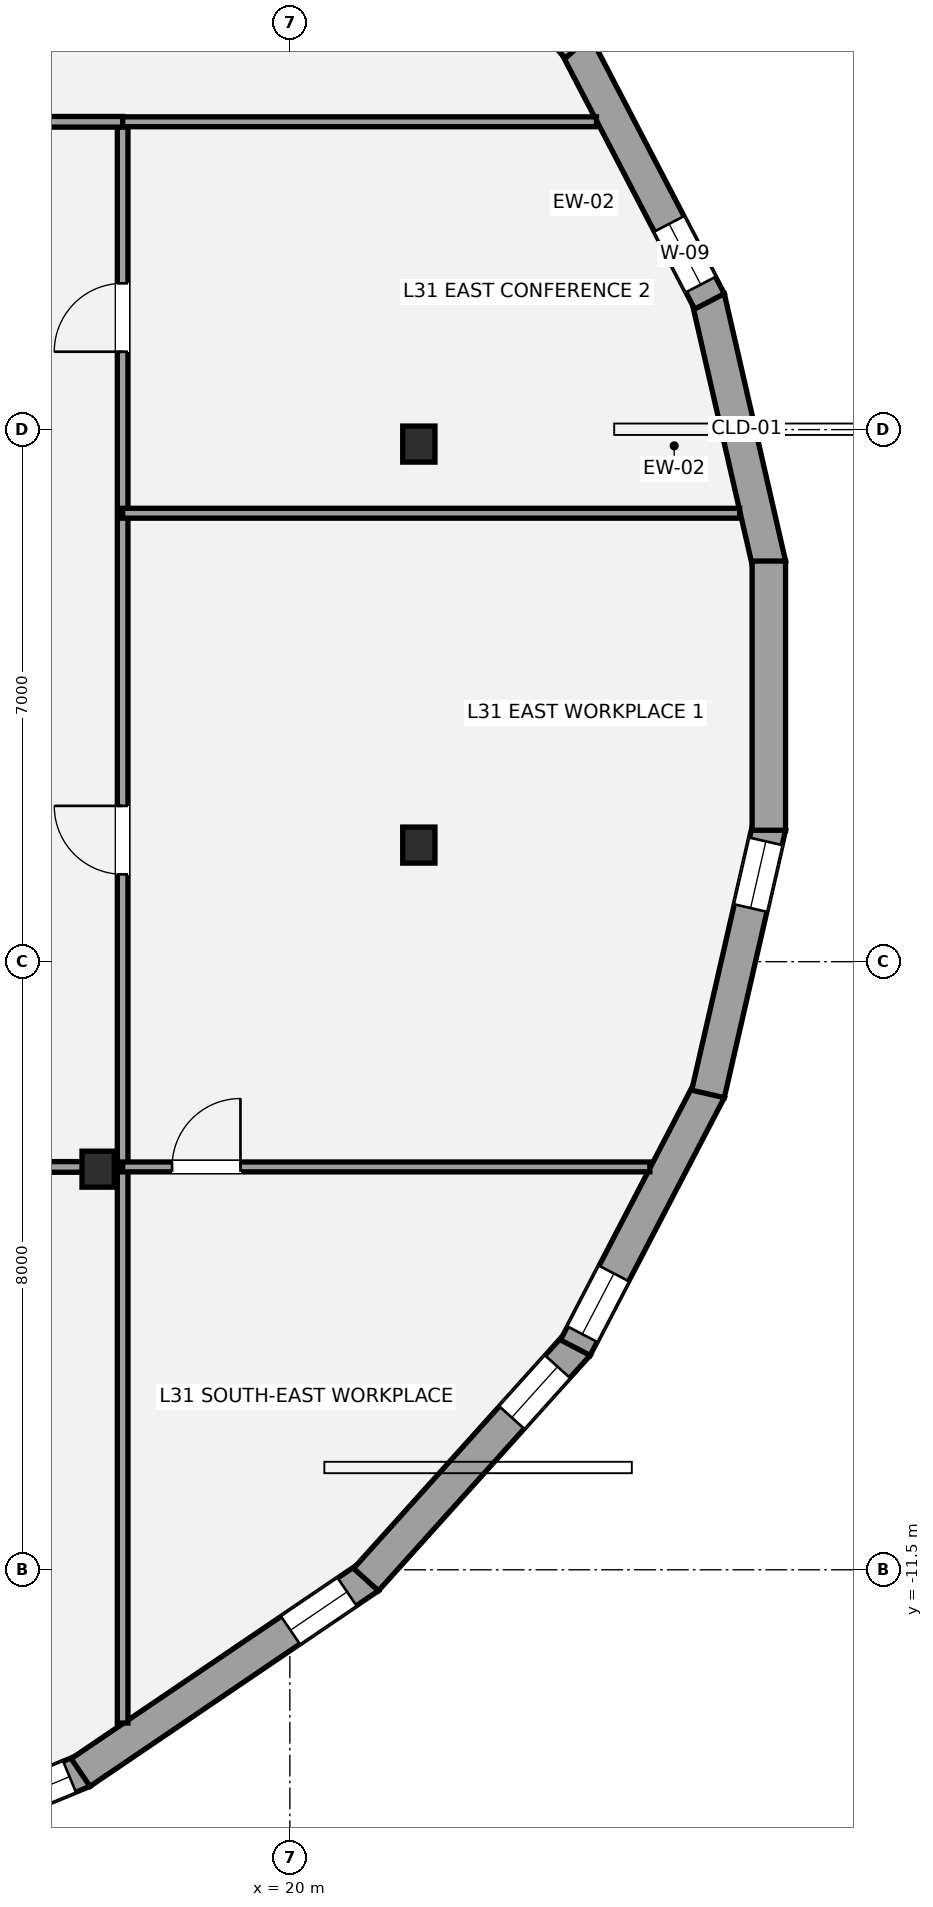
"""IFC4 building model, lengths in metres.
Left out: names, types, materials, properties, quantities, classifications, styles, units other than length and angle.
Written with IfcOpenShell. Run it as: python <this file> out.ifc"""

import sys

from ifc_helpers import new_model, si_unit, direction, frame, frame_2d, origin, origin_2d, place, context, subcontext, project, spatial, rectangle, i_section, extrude, element, fill, save


model = new_model("IFC4")
c1 = context("Model", 3, precision=1e-05, world=origin(), true_north=direction((0.0, 1.0)))
c2 = subcontext(c1, "Body", "Model", "MODEL_VIEW")
j1 = project(units=[si_unit("LENGTHUNIT", "METRE"), si_unit("PLANEANGLEUNIT", "RADIAN")], contexts=[c1])
p1 = place(None, origin())
s1 = spatial("IfcSite", under=j1, at=p1, CompositionType="ELEMENT")
p2 = place(p1, origin())
s2 = spatial("IfcBuilding", under=s1, at=p2, CompositionType="ELEMENT")
p3 = place(p2, frame((0.0, 0.0, 117.6)))
s3 = spatial("IfcBuildingStorey", under=s2, at=p3, CompositionType="ELEMENT", Elevation=117.6)
for number, where, z_axis, x_axis in (
    (1, (21.697, 3.31, 0.0), (0.0, 0.0, 1.0), (1.0, 0.0, 0.0)),
    (2, (17.477, -6.229, 0.0), (0.0, 0.0, 1.0), (1.0, 0.0, 0.0)),
    (3, (21.697, -1.966, 0.0), (0.0, 0.0, 1.0), (1.0, 0.0, 0.0)),
):
    element("IfcColumn", number, at=place(p3, frame(where, z_axis=z_axis, x_axis=x_axis)), inside=s3, PredefinedType="COLUMN", context=c2, shape_type="SweptSolid", body=[
        extrude(i_section(OverallWidth=0.424, OverallDepth=0.474, WebThickness=0.048, FlangeThickness=0.077, at=origin_2d()), origin(), (0.0, 0.0, 1.0), 3.5),
    ])
p4 = place(p3, frame((25.502, 5.24, 0.0), z_axis=(0.0, 0.0, 1.0), x_axis=(0.223322591546, -0.974744592242, 0.0)))
e4 = element("IfcWall", 4, at=p4, inside=s3, PredefinedType="STANDARD", context=c2, shape_type="SweptSolid", body=[
    extrude(rectangle(XDim=3.609, YDim=0.44, at=frame_2d((1.804, 0.0))), origin(), (0.0, 0.0, 1.0), 2.528),
])
p5 = place(p3, frame((23.756, 8.578, 0.0), z_axis=(0.0, 0.0, 1.0), x_axis=(0.461766944701, -0.88700129018, 0.0)))
e5 = element("IfcWall", 5, at=p5, inside=s3, PredefinedType="STANDARD", context=c2, shape_type="SweptSolid", body=[
    extrude(rectangle(XDim=3.823, YDim=0.44, at=frame_2d((1.911, 0.0))), origin(), (0.0, 0.0, 1.0), 2.528),
])
p6 = place(p5, frame((2.673, 0.0, 0.58)))
e6 = element("IfcOpeningElement", 6, at=p6, cuts=e5, PredefinedType="OPENING", context=c2, shape_type="SweptSolid", body=[
    extrude(rectangle(XDim=0.9, YDim=1.35, at=frame_2d((0.45, 0.675))), frame((0.0, 0.23, 0.0), z_axis=(0.0, -1.0, 0.0), x_axis=(1.0, 0.0, 0.0)), (0.0, 0.0, 1.0), 0.46),
])
p7 = place(p3, frame((21.002, 11.629, 0.0), z_axis=(0.0, 0.0, 1.0), x_axis=(0.668754222456, -0.743483550556, 0.0)))
e7 = element("IfcWall", 7, at=p7, inside=s3, PredefinedType="STANDARD", context=c2, shape_type="SweptSolid", body=[
    extrude(rectangle(XDim=4.166, YDim=0.44, at=frame_2d((2.083, 0.0))), origin(), (0.0, 0.0, 1.0), 2.528),
])
p8 = place(p7, frame((0.348, 0.0, 0.58)))
e8 = element("IfcOpeningElement", 8, at=p8, cuts=e7, PredefinedType="OPENING", context=c2, shape_type="SweptSolid", body=[
    extrude(rectangle(XDim=0.9, YDim=1.35, at=frame_2d((0.45, 0.675))), frame((0.0, 0.23, 0.0), z_axis=(0.0, -1.0, 0.0), x_axis=(1.0, 0.0, 0.0)), (0.0, 0.0, 1.0), 0.46),
])
p9 = place(p3, frame((17.286, -14.146, 0.0), z_axis=(0.0, 0.0, 1.0), x_axis=(-0.924140141084, -0.382053660678, 0.0)))
e9 = element("IfcWall", 9, at=p9, inside=s3, PredefinedType="STANDARD", context=c2, shape_type="SweptSolid", body=[
    extrude(rectangle(XDim=4.943, YDim=0.44, at=frame_2d((2.471, 0.0))), origin(), (0.0, 0.0, 1.0), 2.528),
])
p10 = place(p9, frame((0.2, 0.0, 0.45)))
e10 = element("IfcOpeningElement", 10, at=p10, cuts=e9, PredefinedType="OPENING", context=c2, shape_type="SweptSolid", body=[
    extrude(rectangle(XDim=1.4, YDim=1.55, at=frame_2d((0.7, 0.775))), frame((0.0, 0.23, 0.0), z_axis=(0.0, -1.0, 0.0), x_axis=(1.0, 0.0, 0.0)), (0.0, 0.0, 1.0), 0.46),
])
p11 = place(p3, frame((21.042, -11.594, 0.0), z_axis=(0.0, 0.0, 1.0), x_axis=(-0.827700115196, -0.561170668607, 0.0)))
e11 = element("IfcWall", 11, at=p11, inside=s3, PredefinedType="STANDARD", context=c2, shape_type="SweptSolid", body=[
    extrude(rectangle(XDim=4.585, YDim=0.44, at=frame_2d((2.293, 0.0))), origin(), (0.0, 0.0, 1.0), 2.528),
])
p12 = place(p11, frame((0.349, 0.0, 0.58)))
e12 = element("IfcOpeningElement", 12, at=p12, cuts=e11, PredefinedType="OPENING", context=c2, shape_type="SweptSolid", body=[
    extrude(rectangle(XDim=0.9, YDim=1.35, at=frame_2d((0.45, 0.675))), frame((0.0, 0.23, 0.0), z_axis=(0.0, -1.0, 0.0), x_axis=(1.0, 0.0, 0.0)), (0.0, 0.0, 1.0), 0.46),
])
p13 = place(p3, frame((23.787, -8.532, 0.0), z_axis=(0.0, 0.0, 1.0), x_axis=(-0.668754222456, -0.743483550556, 0.0)))
e13 = element("IfcWall", 13, at=p13, inside=s3, PredefinedType="STANDARD", context=c2, shape_type="SweptSolid", body=[
    extrude(rectangle(XDim=4.166, YDim=0.44, at=frame_2d((2.083, 0.0))), origin(), (0.0, 0.0, 1.0), 2.528),
])
p14 = place(p13, frame((0.398, 0.0, 0.58)))
e14 = element("IfcOpeningElement", 14, at=p14, cuts=e13, PredefinedType="OPENING", context=c2, shape_type="SweptSolid", body=[
    extrude(rectangle(XDim=0.9, YDim=1.35, at=frame_2d((0.45, 0.675))), frame((0.0, 0.23, 0.0), z_axis=(0.0, -1.0, 0.0), x_axis=(1.0, 0.0, 0.0)), (0.0, 0.0, 1.0), 0.46),
])
p15 = place(p3, frame((25.521, -5.187, 0.0), z_axis=(0.0, 0.0, 1.0), x_axis=(-0.461766944701, -0.88700129018, 0.0)))
e15 = element("IfcWall", 15, at=p15, inside=s3, PredefinedType="STANDARD", context=c2, shape_type="SweptSolid", body=[
    extrude(rectangle(XDim=3.823, YDim=0.44, at=frame_2d((1.911, 0.0))), origin(), (0.0, 0.0, 1.0), 2.528),
])
p16 = place(p15, frame((2.722, 0.0, 0.58)))
e16 = element("IfcOpeningElement", 16, at=p16, cuts=e15, PredefinedType="OPENING", context=c2, shape_type="SweptSolid", body=[
    extrude(rectangle(XDim=0.9, YDim=1.35, at=frame_2d((0.45, 0.675))), frame((0.0, 0.23, 0.0), z_axis=(0.0, -1.0, 0.0), x_axis=(1.0, 0.0, 0.0)), (0.0, 0.0, 1.0), 0.46),
])
p17 = place(p3, frame((26.308, -1.722, 0.0), z_axis=(0.0, 0.0, 1.0), x_axis=(-0.223322591546, -0.974744592242, 0.0)))
e17 = element("IfcWall", 17, at=p17, inside=s3, PredefinedType="STANDARD", context=c2, shape_type="SweptSolid", body=[
    extrude(rectangle(XDim=3.609, YDim=0.44, at=frame_2d((1.804, 0.0))), origin(), (0.0, 0.0, 1.0), 2.528),
])
p18 = place(p17, frame((0.2, 0.0, 0.42)))
e18 = element("IfcOpeningElement", 18, at=p18, cuts=e17, PredefinedType="OPENING", context=c2, shape_type="SweptSolid", body=[
    extrude(rectangle(XDim=0.9, YDim=1.35, at=frame_2d((0.45, 0.675))), frame((0.0, 0.23, 0.0), z_axis=(0.0, -1.0, 0.0), x_axis=(1.0, 0.0, 0.0)), (0.0, 0.0, 1.0), 0.46),
])
p19 = place(p3, frame((26.302, 1.771, 0.0), z_axis=(0.0, 0.0, 1.0), x_axis=(0.0, -1.0, 0.0)))
e19 = element("IfcWall", 19, at=p19, inside=s3, PredefinedType="STANDARD", context=c2, shape_type="SweptSolid", body=[
    extrude(rectangle(XDim=3.542, YDim=0.44, at=frame_2d((1.771, 0.0))), origin(), (0.0, 0.0, 1.0), 2.528),
])
p20 = place(p3, frame((-16.2, -6.2, 0.0), z_axis=(0.0, 0.0, 1.0), x_axis=(1.0, 0.0, 0.0)))
e20 = element("IfcWall", 20, at=p20, inside=s3, PredefinedType="PARTITIONING", context=c2, shape_type="SweptSolid", body=[
    extrude(rectangle(XDim=34.0, YDim=0.14, at=frame_2d((17.0, 0.0))), origin(), (0.0, 0.0, 1.0), 2.688),
])
p21 = place(p20, frame((2.75, 0.0, 0.0)))
e21 = element("IfcOpeningElement", 21, at=p21, cuts=e20, PredefinedType="OPENING", context=c2, shape_type="SweptSolid", body=[
    extrude(rectangle(XDim=0.9, YDim=2.1, at=frame_2d((0.45, 1.05))), frame((0.0, 0.08, 0.0), z_axis=(0.0, -1.0, 0.0), x_axis=(1.0, 0.0, 0.0)), (0.0, 0.0, 1.0), 0.16),
])
p22 = place(p20, frame((9.45, 0.0, 0.0)))
e22 = element("IfcOpeningElement", 22, at=p22, cuts=e20, PredefinedType="OPENING", context=c2, shape_type="SweptSolid", body=[
    extrude(rectangle(XDim=0.9, YDim=2.1, at=frame_2d((0.45, 1.05))), frame((0.0, 0.08, 0.0), z_axis=(0.0, -1.0, 0.0), x_axis=(1.0, 0.0, 0.0)), (0.0, 0.0, 1.0), 0.16),
])
p23 = place(p20, frame((16.45, 0.0, 0.0)))
e23 = element("IfcOpeningElement", 23, at=p23, cuts=e20, PredefinedType="OPENING", context=c2, shape_type="SweptSolid", body=[
    extrude(rectangle(XDim=0.9, YDim=2.1, at=frame_2d((0.45, 1.05))), frame((0.0, 0.08, 0.0), z_axis=(0.0, -1.0, 0.0), x_axis=(1.0, 0.0, 0.0)), (0.0, 0.0, 1.0), 0.16),
])
p24 = place(p20, frame((22.95, 0.0, 0.0)))
e24 = element("IfcOpeningElement", 24, at=p24, cuts=e20, PredefinedType="OPENING", context=c2, shape_type="SweptSolid", body=[
    extrude(rectangle(XDim=0.9, YDim=2.1, at=frame_2d((0.45, 1.05))), frame((0.0, 0.08, 0.0), z_axis=(0.0, -1.0, 0.0), x_axis=(1.0, 0.0, 0.0)), (0.0, 0.0, 1.0), 0.16),
])
p25 = place(p20, frame((29.45, 0.0, 0.0)))
e25 = element("IfcOpeningElement", 25, at=p25, cuts=e20, PredefinedType="OPENING", context=c2, shape_type="SweptSolid", body=[
    extrude(rectangle(XDim=1.5, YDim=2.15, at=frame_2d((0.75, 1.075))), frame((0.0, 0.08, 0.0), z_axis=(0.0, -1.0, 0.0), x_axis=(1.0, 0.0, 0.0)), (0.0, 0.0, 1.0), 0.16),
])
p26 = place(p3, frame((17.8, -13.517, 0.0), z_axis=(0.0, 0.0, 1.0), x_axis=(0.0, 1.0, 0.0)))
e26 = element("IfcWall", 26, at=p26, inside=s3, PredefinedType="PARTITIONING", context=c2, shape_type="SweptSolid", body=[
    extrude(rectangle(XDim=21.067, YDim=0.14, at=frame_2d((10.533, 0.0))), origin(), (0.0, 0.0, 1.0), 2.688),
])
p27 = place(p26, frame((11.167, 0.0, 0.0)))
e27 = element("IfcOpeningElement", 27, at=p27, cuts=e26, PredefinedType="OPENING", context=c2, shape_type="SweptSolid", body=[
    extrude(rectangle(XDim=0.9, YDim=2.1, at=frame_2d((0.45, 1.05))), frame((0.0, 0.08, 0.0), z_axis=(0.0, -1.0, 0.0), x_axis=(1.0, 0.0, 0.0)), (0.0, 0.0, 1.0), 0.16),
])
p28 = place(p26, frame((18.042, 0.0, 0.0)))
e28 = element("IfcOpeningElement", 28, at=p28, cuts=e26, PredefinedType="OPENING", context=c2, shape_type="SweptSolid", body=[
    extrude(rectangle(XDim=0.9, YDim=2.1, at=frame_2d((0.45, 1.05))), frame((0.0, 0.08, 0.0), z_axis=(0.0, -1.0, 0.0), x_axis=(1.0, 0.0, 0.0)), (0.0, 0.0, 1.0), 0.16),
])
p29 = place(p3, frame((13.9, 7.55, 0.0), z_axis=(0.0, 0.0, 1.0), x_axis=(1.0, 0.0, 0.0)))
e29 = element("IfcWall", 29, at=p29, inside=s3, PredefinedType="PARTITIONING", context=c2, shape_type="SweptSolid", body=[
    extrude(rectangle(XDim=3.9, YDim=0.14, at=frame_2d((1.95, 0.0))), origin(), (0.0, 0.0, 1.0), 2.763),
])
p30 = place(p29, frame((0.32, 0.0, 0.0)))
e30 = element("IfcOpeningElement", 30, at=p30, cuts=e29, PredefinedType="OPENING", context=c2, shape_type="SweptSolid", body=[
    extrude(rectangle(XDim=0.92, YDim=2.15, at=frame_2d((0.46, 1.075))), frame((0.0, 0.08, 0.0), z_axis=(0.0, -1.0, 0.0), x_axis=(1.0, 0.0, 0.0)), (0.0, 0.0, 1.0), 0.16),
])
p31 = place(p3, frame((17.8, 7.55, 0.0), z_axis=(0.0, 0.0, 1.0), x_axis=(1.0, 0.0, 0.0)))
e31 = element("IfcWall", 31, at=p31, inside=s3, PredefinedType="PARTITIONING", context=c2, shape_type="SweptSolid", body=[
    extrude(rectangle(XDim=6.234, YDim=0.13, at=frame_2d((3.117, 0.0))), origin(), (0.0, 0.0, 1.0), 2.763),
])
p32 = place(p3, frame((17.8, -6.2, 0.0), z_axis=(0.0, 0.0, 1.0), x_axis=(1.0, 0.0, 0.0)))
e32 = element("IfcWall", 32, at=p32, inside=s3, PredefinedType="PARTITIONING", context=c2, shape_type="SweptSolid", body=[
    extrude(rectangle(XDim=6.937, YDim=0.13, at=frame_2d((3.468, 0.0))), origin(), (0.0, 0.0, 1.0), 2.763),
])
p33 = place(p32, frame((0.65, 0.0, 0.0)))
e33 = element("IfcOpeningElement", 33, at=p33, cuts=e32, PredefinedType="OPENING", context=c2, shape_type="SweptSolid", body=[
    extrude(rectangle(XDim=0.9, YDim=2.1, at=frame_2d((0.45, 1.05))), frame((0.0, 0.075, 0.0), z_axis=(0.0, -1.0, 0.0), x_axis=(1.0, 0.0, 0.0)), (0.0, 0.0, 1.0), 0.15),
])
p34 = place(p3, frame((17.8, 2.4, 0.0), z_axis=(0.0, 0.0, 1.0), x_axis=(1.0, 0.0, 0.0)))
e34 = element("IfcWall", 34, at=p34, inside=s3, PredefinedType="PARTITIONING", context=c2, shape_type="SweptSolid", body=[
    extrude(rectangle(XDim=8.118, YDim=0.13, at=frame_2d((4.059, 0.0))), origin(), (0.0, 0.0, 1.0), 2.763),
])
p35 = place(p6, origin())
e35 = element("IfcWindow", 35, at=p35, inside=s3, PartitioningType="SINGLE_PANEL", PredefinedType="WINDOW", context=c2, shape_type="SweptSolid", body=[
    extrude(rectangle(XDim=0.9, YDim=1.35, at=frame_2d((0.45, 0.675))), frame((0.0, -0.01, 0.0), z_axis=(0.0, -1.0, 0.0), x_axis=(1.0, 0.0, 0.0)), (0.0, 0.0, 1.0), 0.06),
])
fill(e6, e35)
p36 = place(p10, origin())
e36 = element("IfcWindow", 36, at=p36, inside=s3, PartitioningType="SINGLE_PANEL", PredefinedType="WINDOW", context=c2, shape_type="SweptSolid", body=[
    extrude(rectangle(XDim=1.4, YDim=1.55, at=frame_2d((0.7, 0.775))), frame((0.0, -0.01, 0.0), z_axis=(0.0, -1.0, 0.0), x_axis=(1.0, 0.0, 0.0)), (0.0, 0.0, 1.0), 0.06),
])
fill(e10, e36)
p37 = place(p12, origin())
e37 = element("IfcWindow", 37, at=p37, inside=s3, PartitioningType="SINGLE_PANEL", PredefinedType="WINDOW", context=c2, shape_type="SweptSolid", body=[
    extrude(rectangle(XDim=0.9, YDim=1.35, at=frame_2d((0.45, 0.675))), frame((0.0, -0.01, 0.0), z_axis=(0.0, -1.0, 0.0), x_axis=(1.0, 0.0, 0.0)), (0.0, 0.0, 1.0), 0.06),
])
fill(e12, e37)
p38 = place(p14, origin())
e38 = element("IfcWindow", 38, at=p38, inside=s3, PartitioningType="SINGLE_PANEL", PredefinedType="WINDOW", context=c2, shape_type="SweptSolid", body=[
    extrude(rectangle(XDim=0.9, YDim=1.35, at=frame_2d((0.45, 0.675))), frame((0.0, -0.01, 0.0), z_axis=(0.0, -1.0, 0.0), x_axis=(1.0, 0.0, 0.0)), (0.0, 0.0, 1.0), 0.06),
])
fill(e14, e38)
p39 = place(p16, origin())
e39 = element("IfcWindow", 39, at=p39, inside=s3, PartitioningType="SINGLE_PANEL", PredefinedType="WINDOW", context=c2, shape_type="SweptSolid", body=[
    extrude(rectangle(XDim=0.9, YDim=1.35, at=frame_2d((0.45, 0.675))), frame((0.0, -0.01, 0.0), z_axis=(0.0, -1.0, 0.0), x_axis=(1.0, 0.0, 0.0)), (0.0, 0.0, 1.0), 0.06),
])
fill(e16, e39)
p40 = place(p18, origin())
e40 = element("IfcWindow", 40, at=p40, inside=s3, PartitioningType="SINGLE_PANEL", PredefinedType="WINDOW", context=c2, shape_type="SweptSolid", body=[
    extrude(rectangle(XDim=0.9, YDim=1.35, at=frame_2d((0.45, 0.675))), frame((0.0, -0.01, 0.0), z_axis=(0.0, -1.0, 0.0), x_axis=(1.0, 0.0, 0.0)), (0.0, 0.0, 1.0), 0.06),
])
fill(e18, e40)
p41 = place(p33, origin())
e41 = element("IfcDoor", 41, at=p41, inside=s3, OperationType="SINGLE_SWING_RIGHT", PredefinedType="DOOR", context=c2, shape_type="SweptSolid", body=[
    extrude(rectangle(XDim=0.9, YDim=2.1, at=frame_2d((0.45, 1.05))), frame((0.0, 0.025, 0.0), z_axis=(0.0, -1.0, 0.0), x_axis=(1.0, 0.0, 0.0)), (0.0, 0.0, 1.0), 0.05),
])
fill(e33, e41)
p42 = place(p27, origin())
e42 = element("IfcDoor", 42, at=p42, inside=s3, OperationType="SINGLE_SWING_RIGHT", PredefinedType="DOOR", context=c2, shape_type="SweptSolid", body=[
    extrude(rectangle(XDim=0.9, YDim=2.1, at=frame_2d((0.45, 1.05))), frame((0.0, 0.025, 0.0), z_axis=(0.0, -1.0, 0.0), x_axis=(1.0, 0.0, 0.0)), (0.0, 0.0, 1.0), 0.05),
])
fill(e27, e42)
p43 = place(p28, origin())
e43 = element("IfcDoor", 43, at=p43, inside=s3, OperationType="SINGLE_SWING_LEFT", PredefinedType="DOOR", context=c2, shape_type="SweptSolid", body=[
    extrude(rectangle(XDim=0.9, YDim=2.1, at=frame_2d((0.45, 1.05))), frame((0.0, 0.025, 0.0), z_axis=(0.0, -1.0, 0.0), x_axis=(1.0, 0.0, 0.0)), (0.0, 0.0, 1.0), 0.05),
])
fill(e28, e43)
save(model, sys.argv[1])
